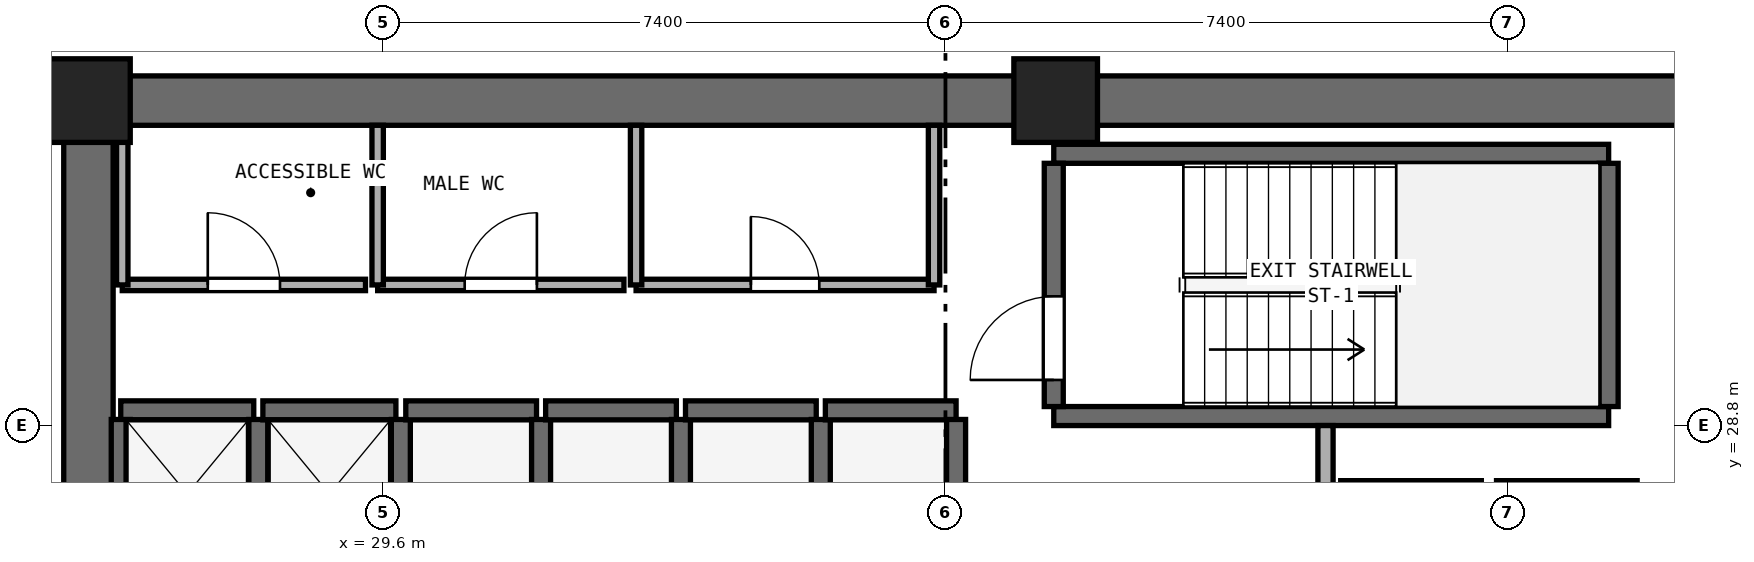
"""IFC4 building model, lengths in metres.
Left out: names, types, materials, properties, quantities, classifications, styles, units other than length and angle.
Written with IfcOpenShell. Run it as: python <this file> out.ifc"""

import sys

from ifc_helpers import new_model, si_unit, direction, frame, frame_2d, origin, origin_2d, place, context, subcontext, project, spatial, rectangle, extrude, element, fill, save


model = new_model("IFC4")
c1 = context("Model", 3, precision=1e-05, world=origin(), true_north=direction((0.0, 1.0)))
c2 = subcontext(c1, "Body", "Model", "MODEL_VIEW")
j1 = project(units=[si_unit("LENGTHUNIT", "METRE"), si_unit("PLANEANGLEUNIT", "RADIAN")], contexts=[c1])
p1 = place(None, origin())
s1 = spatial("IfcSite", under=j1, at=p1, CompositionType="ELEMENT")
p2 = place(p1, origin())
s2 = spatial("IfcBuilding", under=s1, at=p2, CompositionType="ELEMENT")
p3 = place(p2, frame((0.0, 0.0, 47.8)))
s3 = spatial("IfcBuildingStorey", under=s2, at=p3, CompositionType="ELEMENT", Elevation=47.8)
p4 = place(p3, frame((25.4, 33.075, 0.0), z_axis=(0.0, 0.0, 1.0), x_axis=(1.0, 0.0, 0.0)))
e1 = element("IfcWall", 1, at=p4, inside=s3, PredefinedType="SHEAR", context=c2, shape_type="SweptSolid", body=[
    extrude(rectangle(XDim=23.2, YDim=0.65, at=frame_2d((11.6, 0.0))), origin(), (0.0, 0.0, 1.0), 3.525),
])
p5 = place(p3, frame((25.725, 17.65, 0.0), z_axis=(0.0, 0.0, 1.0), x_axis=(0.0, 1.0, 0.0)))
e2 = element("IfcWall", 2, at=p5, inside=s3, PredefinedType="SHEAR", context=c2, shape_type="SweptSolid", body=[
    extrude(rectangle(XDim=15.1, YDim=0.65, at=frame_2d((7.55, 0.0))), origin(), (0.0, 0.0, 1.0), 3.525),
])
p6 = place(p5, frame((6.8, 0.0, 0.0)))
e3 = element("IfcOpeningElement", 3, at=p6, cuts=e2, PredefinedType="OPENING", context=c2, shape_type="SweptSolid", body=[
    extrude(rectangle(XDim=1.5, YDim=2.15, at=frame_2d((0.75, 1.075))), frame((0.0, 0.335, 0.0), z_axis=(0.0, -1.0, 0.0), x_axis=(1.0, 0.0, 0.0)), (0.0, 0.0, 1.0), 0.67),
])
for number, where, z_axis, x_axis in (
    (4, (38.45, 33.075, 0.0), (0.0, 0.0, 1.0), (1.0, 0.0, 0.0)),
    (5, (25.725, 33.075, 0.0), (0.0, 0.0, 1.0), (1.0, 0.0, 0.0)),
):
    element("IfcColumn", number, at=place(p3, frame(where, z_axis=z_axis, x_axis=x_axis)), inside=s3, PredefinedType="PILASTER", context=c2, shape_type="SweptSolid", body=[
        extrude(rectangle(XDim=1.1, YDim=1.1, at=origin_2d()), origin(), (0.0, 0.0, 1.0), 3.8),
    ])
for number, where, z_axis, x_axis in (
    (6, (38.425, 28.925, 0.0), (0.0, 0.0, 1.0), (1.0, 0.0, 0.0)),
    (7, (38.425, 32.375, 0.0), (0.0, 0.0, 1.0), (1.0, 0.0, 0.0)),
):
    element("IfcWall", number, at=place(p3, frame(where, z_axis=z_axis, x_axis=x_axis)), inside=s3, PredefinedType="SHEAR", context=c2, shape_type="SweptSolid", body=[
        extrude(rectangle(XDim=7.3, YDim=0.25, at=frame_2d((3.65, 0.0))), origin(), (0.0, 0.0, 1.0), 3.525),
    ])
p7 = place(p3, frame((38.425, 29.05, 0.0), z_axis=(0.0, 0.0, 1.0), x_axis=(0.0, 1.0, 0.0)))
e8 = element("IfcWall", 8, at=p7, inside=s3, PredefinedType="SHEAR", context=c2, shape_type="SweptSolid", body=[
    extrude(rectangle(XDim=3.2, YDim=0.25, at=frame_2d((1.6, 0.0))), origin(), (0.0, 0.0, 1.0), 3.525),
])
p8 = place(p7, frame((0.35, 0.0, 0.0)))
e9 = element("IfcOpeningElement", 9, at=p8, cuts=e8, PredefinedType="OPENING", context=c2, shape_type="SweptSolid", body=[
    extrude(rectangle(XDim=1.1, YDim=2.15, at=frame_2d((0.55, 1.075))), frame((0.0, 0.135, 0.0), z_axis=(0.0, -1.0, 0.0), x_axis=(1.0, 0.0, 0.0)), (0.0, 0.0, 1.0), 0.27),
])
p9 = place(p3, frame((45.725, 29.05, 0.0), z_axis=(0.0, 0.0, 1.0), x_axis=(0.0, 1.0, 0.0)))
e10 = element("IfcWall", 10, at=p9, inside=s3, PredefinedType="SHEAR", context=c2, shape_type="SweptSolid", body=[
    extrude(rectangle(XDim=3.2, YDim=0.25, at=frame_2d((1.6, 0.0))), origin(), (0.0, 0.0, 1.0), 3.525),
])
p10 = place(p3, frame((26.15, 29.0, 0.0), z_axis=(0.0, 0.0, 1.0), x_axis=(1.0, 0.0, 0.0)))
e11 = element("IfcWall", 11, at=p10, inside=s3, PredefinedType="SHEAR", context=c2, shape_type="SweptSolid", body=[
    extrude(rectangle(XDim=1.75, YDim=0.25, at=frame_2d((0.875, 0.0))), origin(), (0.0, 0.0, 1.0), 3.525),
])
for number, where, z_axis, x_axis in (
    (12, (26.15, 26.92, 0.0), (0.0, 0.0, 1.0), (0.0, 1.0, 0.0)),
    (13, (27.96, 26.92, 0.0), (0.0, 0.0, 1.0), (0.0, 1.0, 0.0)),
):
    element("IfcWall", number, at=place(p3, frame(where, z_axis=z_axis, x_axis=x_axis)), inside=s3, PredefinedType="SHEAR", context=c2, shape_type="SweptSolid", body=[
        extrude(rectangle(XDim=1.96, YDim=0.25, at=frame_2d((0.98, 0.0))), origin(), (0.0, 0.0, 1.0), 3.525),
    ])
p11 = place(p3, frame((28.02, 29.0, 0.0), z_axis=(0.0, 0.0, 1.0), x_axis=(1.0, 0.0, 0.0)))
e14 = element("IfcWall", 14, at=p11, inside=s3, PredefinedType="SHEAR", context=c2, shape_type="SweptSolid", body=[
    extrude(rectangle(XDim=1.75, YDim=0.25, at=frame_2d((0.875, 0.0))), origin(), (0.0, 0.0, 1.0), 3.525),
])
p12 = place(p3, frame((29.835, 26.92, 0.0), z_axis=(0.0, 0.0, 1.0), x_axis=(0.0, 1.0, 0.0)))
e15 = element("IfcWall", 15, at=p12, inside=s3, PredefinedType="SHEAR", context=c2, shape_type="SweptSolid", body=[
    extrude(rectangle(XDim=1.96, YDim=0.25, at=frame_2d((0.98, 0.0))), origin(), (0.0, 0.0, 1.0), 3.525),
])
p13 = place(p3, frame((29.9, 29.0, 0.0), z_axis=(0.0, 0.0, 1.0), x_axis=(1.0, 0.0, 0.0)))
e16 = element("IfcWall", 16, at=p13, inside=s3, PredefinedType="SHEAR", context=c2, shape_type="SweptSolid", body=[
    extrude(rectangle(XDim=1.72, YDim=0.25, at=frame_2d((0.86, 0.0))), origin(), (0.0, 0.0, 1.0), 3.525),
])
p14 = place(p3, frame((31.68, 26.92, 0.0), z_axis=(0.0, 0.0, 1.0), x_axis=(0.0, 1.0, 0.0)))
e17 = element("IfcWall", 17, at=p14, inside=s3, PredefinedType="SHEAR", context=c2, shape_type="SweptSolid", body=[
    extrude(rectangle(XDim=1.96, YDim=0.25, at=frame_2d((0.98, 0.0))), origin(), (0.0, 0.0, 1.0), 3.525),
])
p15 = place(p3, frame((31.74, 29.0, 0.0), z_axis=(0.0, 0.0, 1.0), x_axis=(1.0, 0.0, 0.0)))
e18 = element("IfcWall", 18, at=p15, inside=s3, PredefinedType="SHEAR", context=c2, shape_type="SweptSolid", body=[
    extrude(rectangle(XDim=1.72, YDim=0.25, at=frame_2d((0.86, 0.0))), origin(), (0.0, 0.0, 1.0), 3.525),
])
p16 = place(p3, frame((33.52, 26.92, 0.0), z_axis=(0.0, 0.0, 1.0), x_axis=(0.0, 1.0, 0.0)))
e19 = element("IfcWall", 19, at=p16, inside=s3, PredefinedType="SHEAR", context=c2, shape_type="SweptSolid", body=[
    extrude(rectangle(XDim=1.96, YDim=0.25, at=frame_2d((0.98, 0.0))), origin(), (0.0, 0.0, 1.0), 3.525),
])
p17 = place(p3, frame((33.58, 29.0, 0.0), z_axis=(0.0, 0.0, 1.0), x_axis=(1.0, 0.0, 0.0)))
e20 = element("IfcWall", 20, at=p17, inside=s3, PredefinedType="SHEAR", context=c2, shape_type="SweptSolid", body=[
    extrude(rectangle(XDim=1.72, YDim=0.25, at=frame_2d((0.86, 0.0))), origin(), (0.0, 0.0, 1.0), 3.525),
])
p18 = place(p3, frame((35.36, 26.92, 0.0), z_axis=(0.0, 0.0, 1.0), x_axis=(0.0, 1.0, 0.0)))
e21 = element("IfcWall", 21, at=p18, inside=s3, PredefinedType="SHEAR", context=c2, shape_type="SweptSolid", body=[
    extrude(rectangle(XDim=1.96, YDim=0.25, at=frame_2d((0.98, 0.0))), origin(), (0.0, 0.0, 1.0), 3.525),
])
p19 = place(p3, frame((35.42, 29.0, 0.0), z_axis=(0.0, 0.0, 1.0), x_axis=(1.0, 0.0, 0.0)))
e22 = element("IfcWall", 22, at=p19, inside=s3, PredefinedType="SHEAR", context=c2, shape_type="SweptSolid", body=[
    extrude(rectangle(XDim=1.72, YDim=0.25, at=frame_2d((0.86, 0.0))), origin(), (0.0, 0.0, 1.0), 3.525),
])
p20 = place(p3, frame((37.14, 26.92, 0.0), z_axis=(0.0, 0.0, 1.0), x_axis=(0.0, 1.0, 0.0)))
e23 = element("IfcWall", 23, at=p20, inside=s3, PredefinedType="SHEAR", context=c2, shape_type="SweptSolid", body=[
    extrude(rectangle(XDim=1.96, YDim=0.25, at=frame_2d((0.98, 0.0))), origin(), (0.0, 0.0, 1.0), 3.525),
])
for number, where, z_axis, x_axis in (
    (24, (42.2, 27.95, 0.0), (0.0, 0.0, 1.0), (1.0, 0.0, 0.0)),
    (25, (44.25, 27.95, 0.0), (0.0, 0.0, 1.0), (1.0, 0.0, 0.0)),
):
    element("IfcWall", number, at=place(p3, frame(where, z_axis=z_axis, x_axis=x_axis)), inside=s3, PredefinedType="SHEAR", context=c2, shape_type="SweptSolid", body=[
        extrude(rectangle(XDim=1.85, YDim=0.25, at=frame_2d((0.925, 0.0))), origin(), (0.0, 0.0, 1.0), 3.525),
    ])
p21 = place(p3, frame((42.0, 22.75, 0.0), z_axis=(0.0, 0.0, 1.0), x_axis=(0.0, 1.0, 0.0)))
e26 = element("IfcWall", 26, at=p21, inside=s3, PredefinedType="SOLIDWALL", context=c2, shape_type="SweptSolid", body=[
    extrude(rectangle(XDim=6.05, YDim=0.2, at=frame_2d((3.025, 0.0))), origin(), (0.0, 0.0, 1.0), 3.525),
])
p22 = place(p21, frame((0.65, 0.0, 0.0)))
e27 = element("IfcOpeningElement", 27, at=p22, cuts=e26, PredefinedType="OPENING", context=c2, shape_type="SweptSolid", body=[
    extrude(rectangle(XDim=1.2, YDim=2.15, at=frame_2d((0.6, 1.075))), frame((0.0, 0.11, 0.0), z_axis=(0.0, -1.0, 0.0), x_axis=(1.0, 0.0, 0.0)), (0.0, 0.0, 1.0), 0.22),
])
p23 = place(p3, frame((26.17, 30.65, 0.0), z_axis=(0.0, 0.0, 1.0), x_axis=(1.0, 0.0, 0.0)))
e28 = element("IfcWall", 28, at=p23, inside=s3, PredefinedType="PARTITIONING", context=c2, shape_type="SweptSolid", body=[
    extrude(rectangle(XDim=3.2, YDim=0.15, at=frame_2d((1.6, 0.0))), origin(), (0.0, 0.0, 1.0), 3.525),
])
p24 = place(p23, frame((1.125, 0.0, 0.0)))
e29 = element("IfcOpeningElement", 29, at=p24, cuts=e28, PredefinedType="OPENING", context=c2, shape_type="SweptSolid", body=[
    extrude(rectangle(XDim=0.95, YDim=2.1, at=frame_2d((0.475, 1.05))), frame((0.0, 0.085, 0.0), z_axis=(0.0, -1.0, 0.0), x_axis=(1.0, 0.0, 0.0)), (0.0, 0.0, 1.0), 0.17),
])
p25 = place(p3, frame((26.17, 30.65, 0.0), z_axis=(0.0, 0.0, 1.0), x_axis=(0.0, 1.0, 0.0)))
e30 = element("IfcWall", 30, at=p25, inside=s3, PredefinedType="PARTITIONING", context=c2, shape_type="SweptSolid", body=[
    extrude(rectangle(XDim=2.1, YDim=0.15, at=frame_2d((1.05, 0.0))), origin(), (0.0, 0.0, 1.0), 3.525),
])
p26 = place(p3, frame((29.53, 30.65, 0.0), z_axis=(0.0, 0.0, 1.0), x_axis=(1.0, 0.0, 0.0)))
e31 = element("IfcWall", 31, at=p26, inside=s3, PredefinedType="PARTITIONING", context=c2, shape_type="SweptSolid", body=[
    extrude(rectangle(XDim=3.24, YDim=0.15, at=frame_2d((1.62, 0.0))), origin(), (0.0, 0.0, 1.0), 3.525),
])
p27 = place(p26, frame((1.145, 0.0, 0.0)))
e32 = element("IfcOpeningElement", 32, at=p27, cuts=e31, PredefinedType="OPENING", context=c2, shape_type="SweptSolid", body=[
    extrude(rectangle(XDim=0.95, YDim=2.1, at=frame_2d((0.475, 1.05))), frame((0.0, 0.085, 0.0), z_axis=(0.0, -1.0, 0.0), x_axis=(1.0, 0.0, 0.0)), (0.0, 0.0, 1.0), 0.17),
])
p28 = place(p3, frame((29.53, 30.65, 0.0), z_axis=(0.0, 0.0, 1.0), x_axis=(0.0, 1.0, 0.0)))
e33 = element("IfcWall", 33, at=p28, inside=s3, PredefinedType="PARTITIONING", context=c2, shape_type="SweptSolid", body=[
    extrude(rectangle(XDim=2.1, YDim=0.15, at=frame_2d((1.05, 0.0))), origin(), (0.0, 0.0, 1.0), 3.525),
])
p29 = place(p3, frame((32.93, 30.65, 0.0), z_axis=(0.0, 0.0, 1.0), x_axis=(1.0, 0.0, 0.0)))
e34 = element("IfcWall", 34, at=p29, inside=s3, PredefinedType="PARTITIONING", context=c2, shape_type="SweptSolid", body=[
    extrude(rectangle(XDim=3.92, YDim=0.15, at=frame_2d((1.96, 0.0))), origin(), (0.0, 0.0, 1.0), 3.525),
])
p30 = place(p29, frame((1.51, 0.0, 0.0)))
e35 = element("IfcOpeningElement", 35, at=p30, cuts=e34, PredefinedType="OPENING", context=c2, shape_type="SweptSolid", body=[
    extrude(rectangle(XDim=0.9, YDim=2.1, at=frame_2d((0.45, 1.05))), frame((0.0, 0.085, 0.0), z_axis=(0.0, -1.0, 0.0), x_axis=(1.0, 0.0, 0.0)), (0.0, 0.0, 1.0), 0.17),
])
for number, where, z_axis, x_axis in (
    (36, (32.93, 30.65, 0.0), (0.0, 0.0, 1.0), (0.0, 1.0, 0.0)),
    (37, (36.85, 30.65, 0.0), (0.0, 0.0, 1.0), (0.0, 1.0, 0.0)),
):
    element("IfcWall", number, at=place(p3, frame(where, z_axis=z_axis, x_axis=x_axis)), inside=s3, PredefinedType="PARTITIONING", context=c2, shape_type="SweptSolid", body=[
        extrude(rectangle(XDim=2.1, YDim=0.15, at=frame_2d((1.05, 0.0))), origin(), (0.0, 0.0, 1.0), 3.525),
    ])
p31 = place(p8, origin())
e38 = element("IfcDoor", 38, at=p31, inside=s3, OperationType="SINGLE_SWING_LEFT", PredefinedType="DOOR", context=c2, shape_type="SweptSolid", body=[
    extrude(rectangle(XDim=1.1, YDim=2.15, at=frame_2d((0.55, 1.075))), frame((0.0, 0.025, 0.0), z_axis=(0.0, -1.0, 0.0), x_axis=(1.0, 0.0, 0.0)), (0.0, 0.0, 1.0), 0.05),
])
fill(e9, e38)
p32 = place(p24, origin())
e39 = element("IfcDoor", 39, at=p32, inside=s3, OperationType="SINGLE_SWING_LEFT", PredefinedType="DOOR", context=c2, shape_type="SweptSolid", body=[
    extrude(rectangle(XDim=0.95, YDim=2.1, at=frame_2d((0.475, 1.05))), frame((0.0, 0.025, 0.0), z_axis=(0.0, -1.0, 0.0), x_axis=(1.0, 0.0, 0.0)), (0.0, 0.0, 1.0), 0.05),
])
fill(e29, e39)
p33 = place(p27, origin())
e40 = element("IfcDoor", 40, at=p33, inside=s3, OperationType="SINGLE_SWING_RIGHT", PredefinedType="DOOR", context=c2, shape_type="SweptSolid", body=[
    extrude(rectangle(XDim=0.95, YDim=2.1, at=frame_2d((0.475, 1.05))), frame((0.0, 0.025, 0.0), z_axis=(0.0, -1.0, 0.0), x_axis=(1.0, 0.0, 0.0)), (0.0, 0.0, 1.0), 0.05),
])
fill(e32, e40)
p34 = place(p30, origin())
e41 = element("IfcDoor", 41, at=p34, inside=s3, OperationType="SINGLE_SWING_LEFT", PredefinedType="DOOR", context=c2, shape_type="SweptSolid", body=[
    extrude(rectangle(XDim=0.9, YDim=2.1, at=frame_2d((0.45, 1.05))), frame((0.0, 0.025, 0.0), z_axis=(0.0, -1.0, 0.0), x_axis=(1.0, 0.0, 0.0)), (0.0, 0.0, 1.0), 0.05),
])
fill(e35, e41)
save(model, sys.argv[1])
